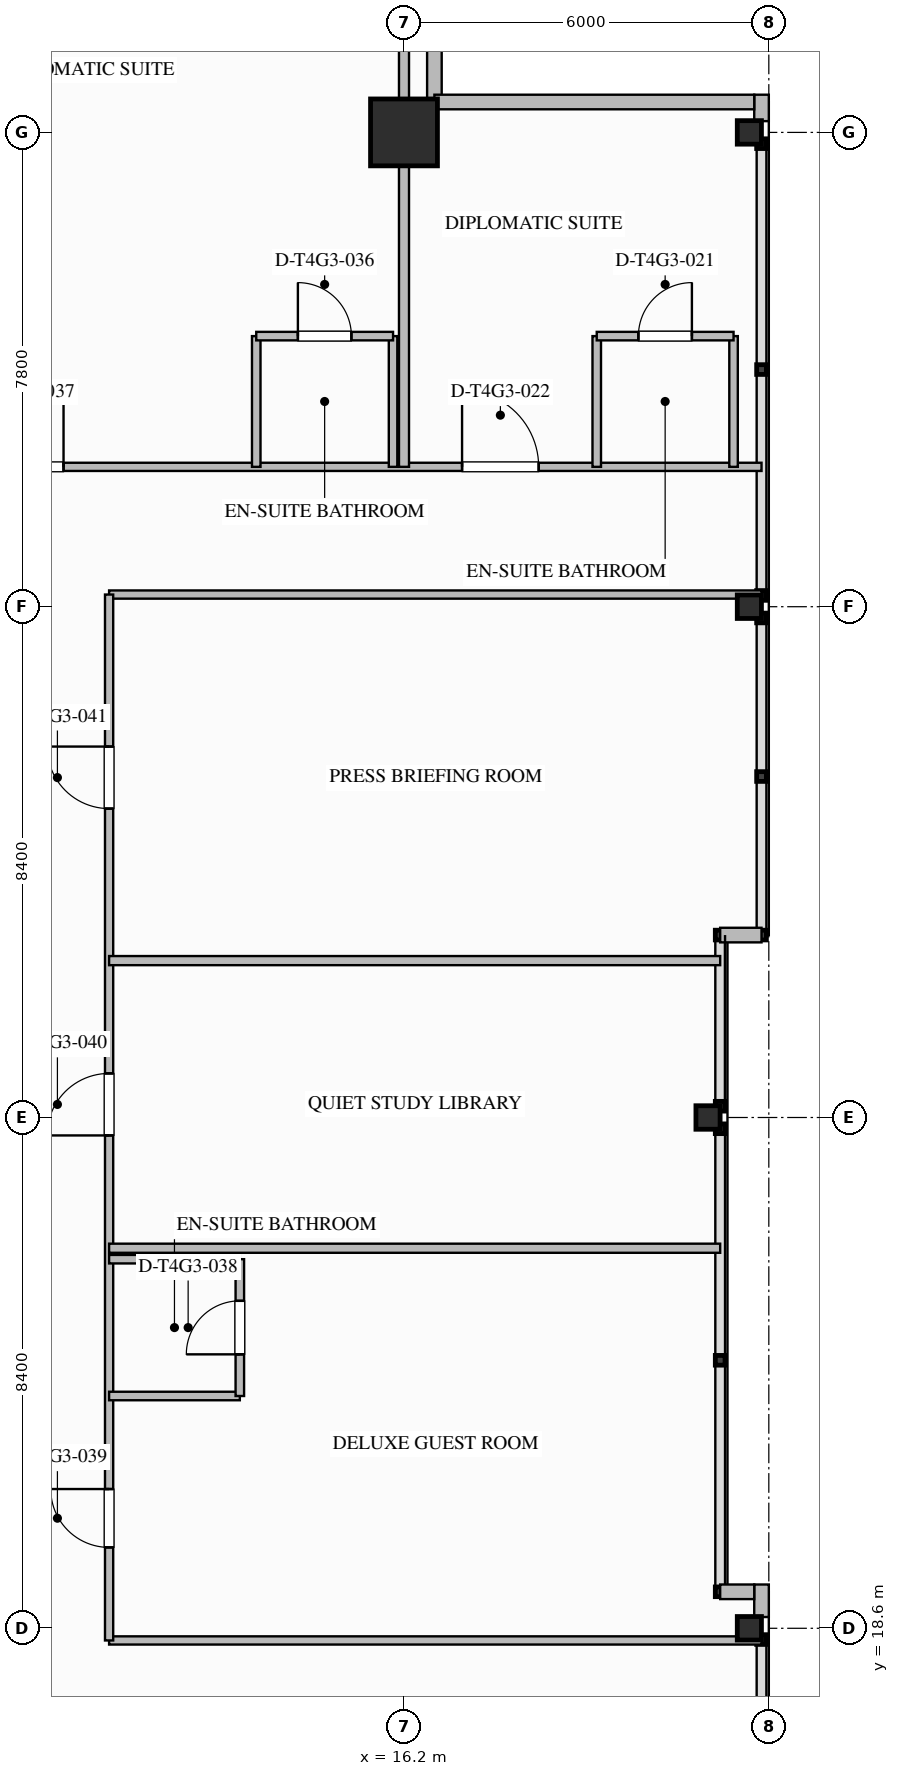
"""IFC4 building model, lengths in metres.
Left out: names, types, materials, properties, quantities, classifications, styles, units other than length and angle.
Written with IfcOpenShell. Run it as: python <this file> out.ifc"""

import sys

from ifc_helpers import new_model, si_unit, direction, frame, frame_2d, origin, origin_2d, place, context, subcontext, project, spatial, rectangle, i_section, extrude, element, fill, save


model = new_model("IFC4")
c1 = context("Model", 3, precision=1e-05, world=origin(), true_north=direction((0.0, 1.0)))
c2 = subcontext(c1, "Body", "Model", "MODEL_VIEW")
j1 = project(units=[si_unit("LENGTHUNIT", "METRE"), si_unit("PLANEANGLEUNIT", "RADIAN")], contexts=[c1])
p1 = place(None, origin())
s1 = spatial("IfcSite", under=j1, at=p1, CompositionType="ELEMENT")
p2 = place(p1, origin())
s2 = spatial("IfcBuilding", under=s1, at=p2, CompositionType="ELEMENT")
p3 = place(p2, frame((0.0, 0.0, 226.7)))
s3 = spatial("IfcBuildingStorey", under=s2, at=p3, CompositionType="ELEMENT", Elevation=226.7)
p4 = place(p3, frame((16.2, 43.2, 0.0), z_axis=(0.0, 0.0, 1.0), x_axis=(1.0, 0.0, 0.0)))
e1 = element("IfcColumn", 1, at=p4, inside=s3, PredefinedType="COLUMN", context=c2, shape_type="SweptSolid", body=[
    extrude(rectangle(XDim=1.1, YDim=1.1, at=origin_2d()), origin(), (0.0, 0.0, 1.0), 3.6),
])
for number, where, z_axis, x_axis in (
    (2, (21.88, 18.6, 0.0), (0.0, 0.0, 1.0), (1.0, 0.0, 0.0)),
    (3, (21.2, 27.0, 0.0), (0.0, 0.0, 1.0), (1.0, 0.0, 0.0)),
    (4, (21.88, 35.4, 0.0), (0.0, 0.0, 1.0), (1.0, 0.0, 0.0)),
    (5, (21.88, 43.2, 0.0), (0.0, 0.0, 1.0), (1.0, 0.0, 0.0)),
):
    element("IfcColumn", number, at=place(p3, frame(where, z_axis=z_axis, x_axis=x_axis)), inside=s3, PredefinedType="COLUMN", context=c2, shape_type="SweptSolid", body=[
        extrude(i_section(OverallWidth=0.397, OverallDepth=0.387, WebThickness=0.021, FlangeThickness=0.033, FilletRadius=0.025, at=origin_2d()), origin(), (0.0, 0.0, 1.0), 3.597),
    ])
p5 = place(p3, frame((22.08, 43.82, 0.0), z_axis=(0.0, 0.0, 1.0), x_axis=(0.0, -1.0, 0.0)))
e6 = element("IfcWall", 6, at=p5, inside=s3, PredefinedType="STANDARD", context=c2, shape_type="SweptSolid", body=[
    extrude(rectangle(XDim=0.435, YDim=0.24, at=frame_2d((0.217, 0.0))), origin(), (0.0, 0.0, 1.0), 3.34),
])
p6 = place(p3, frame((22.08, 19.32, 0.0), z_axis=(0.0, 0.0, 1.0), x_axis=(0.0, -1.0, 0.0)))
e7 = element("IfcWall", 7, at=p6, inside=s3, PredefinedType="STANDARD", context=c2, shape_type="SweptSolid", body=[
    extrude(rectangle(XDim=0.535, YDim=0.24, at=frame_2d((0.267, 0.0))), origin(), (0.0, 0.0, 1.0), 3.34),
])
for number, where, z_axis, x_axis in (
    (8, (16.7, 48.96, 0.0), (0.0, 0.0, 1.0), (0.0, -1.0, 0.0)),
    (9, (16.7, 43.7, 0.0), (0.0, 0.0, 1.0), (1.0, 0.0, 0.0)),
):
    element("IfcWall", number, at=place(p3, frame(where, z_axis=z_axis, x_axis=x_axis)), inside=s3, PredefinedType="STANDARD", context=c2, shape_type="SweptSolid", body=[
        extrude(rectangle(XDim=5.26, YDim=0.24, at=frame_2d((2.63, 0.0))), origin(), (0.0, 0.0, 1.0), 3.34),
    ])
p7 = place(p3, frame((22.08, 30.0, 0.0), z_axis=(0.0, 0.0, 1.0), x_axis=(-1.0, 0.0, 0.0)))
e10 = element("IfcWall", 10, at=p7, inside=s3, PredefinedType="STANDARD", context=c2, shape_type="SweptSolid", body=[
    extrude(rectangle(XDim=0.68, YDim=0.24, at=frame_2d((0.34, 0.0))), origin(), (0.0, 0.0, 1.0), 3.34),
])
p8 = place(p3, frame((21.4, 19.2, 0.0), z_axis=(0.0, 0.0, 1.0), x_axis=(1.0, 0.0, 0.0)))
e11 = element("IfcWall", 11, at=p8, inside=s3, PredefinedType="STANDARD", context=c2, shape_type="SweptSolid", body=[
    extrude(rectangle(XDim=0.56, YDim=0.24, at=frame_2d((0.28, 0.0))), origin(), (0.0, 0.0, 1.0), 3.34),
])
p9 = place(p3, frame((-16.2, 37.7, 0.0), z_axis=(0.0, 0.0, 1.0), x_axis=(1.0, 0.0, 0.0)))
e12 = element("IfcWall", 12, at=p9, inside=s3, PredefinedType="PARTITIONING", context=c2, shape_type="SweptSolid", body=[
    extrude(rectangle(XDim=38.28, YDim=0.135, at=frame_2d((19.14, 0.0))), origin(), (0.0, 0.0, 1.0), 3.34),
])
p10 = place(p9, frame((33.355, 0.0, 0.0)))
e13 = element("IfcOpeningElement", 13, at=p10, cuts=e12, PredefinedType="OPENING", context=c2, shape_type="SweptSolid", body=[
    extrude(rectangle(XDim=1.26, YDim=2.2, at=frame_2d((0.63, 1.1))), frame((0.0, 0.077, 0.0), z_axis=(0.0, -1.0, 0.0), x_axis=(1.0, 0.0, 0.0)), (0.0, 0.0, 1.0), 0.155),
])
p11 = place(p9, frame((2.784, 0.0, 0.0)))
e14 = element("IfcOpeningElement", 14, at=p11, cuts=e12, PredefinedType="OPENING", context=c2, shape_type="SweptSolid", body=[
    extrude(rectangle(XDim=1.26, YDim=2.2, at=frame_2d((0.63, 1.1))), frame((0.0, 0.077, 0.0), z_axis=(0.0, -1.0, 0.0), x_axis=(1.0, 0.0, 0.0)), (0.0, 0.0, 1.0), 0.155),
])
p12 = place(p9, frame((13.969, 0.0, 0.0)))
e15 = element("IfcOpeningElement", 15, at=p12, cuts=e12, PredefinedType="OPENING", context=c2, shape_type="SweptSolid", body=[
    extrude(rectangle(XDim=1.26, YDim=2.2, at=frame_2d((0.63, 1.1))), frame((0.0, 0.077, 0.0), z_axis=(0.0, -1.0, 0.0), x_axis=(1.0, 0.0, 0.0)), (0.0, 0.0, 1.0), 0.155),
])
p13 = place(p9, frame((25.541, 0.0, 0.0)))
e16 = element("IfcOpeningElement", 16, at=p13, cuts=e12, PredefinedType="OPENING", context=c2, shape_type="SweptSolid", body=[
    extrude(rectangle(XDim=1.26, YDim=2.2, at=frame_2d((0.63, 1.1))), frame((0.0, 0.077, 0.0), z_axis=(0.0, -1.0, 0.0), x_axis=(1.0, 0.0, 0.0)), (0.0, 0.0, 1.0), 0.155),
])
for number, where, z_axis, x_axis in (
    (17, (11.35, 18.4, 0.0), (0.0, 0.0, 1.0), (1.0, 0.0, 0.0)),
    (18, (11.35, 35.6, 0.0), (0.0, 0.0, 1.0), (1.0, 0.0, 0.0)),
):
    element("IfcWall", number, at=place(p3, frame(where, z_axis=z_axis, x_axis=x_axis)), inside=s3, PredefinedType="PARTITIONING", context=c2, shape_type="SweptSolid", body=[
        extrude(rectangle(XDim=10.73, YDim=0.135, at=frame_2d((5.365, 0.0))), origin(), (0.0, 0.0, 1.0), 2.718),
    ])
p14 = place(p3, frame((11.35, 18.4, 0.0), z_axis=(0.0, 0.0, 1.0), x_axis=(0.0, 1.0, 0.0)))
e19 = element("IfcWall", 19, at=p14, inside=s3, PredefinedType="PARTITIONING", context=c2, shape_type="SweptSolid", body=[
    extrude(rectangle(XDim=17.2, YDim=0.135, at=frame_2d((8.6, 0.0))), origin(), (0.0, 0.0, 1.0), 3.34),
])
p15 = place(p14, frame((1.53, 0.0, 0.0)))
e20 = element("IfcOpeningElement", 20, at=p15, cuts=e19, PredefinedType="OPENING", context=c2, shape_type="SweptSolid", body=[
    extrude(rectangle(XDim=0.96, YDim=2.15, at=frame_2d((0.48, 1.075))), frame((0.0, 0.077, 0.0), z_axis=(0.0, -1.0, 0.0), x_axis=(1.0, 0.0, 0.0)), (0.0, 0.0, 1.0), 0.155),
])
p16 = place(p14, frame((8.305, 0.0, 0.0)))
e21 = element("IfcOpeningElement", 21, at=p16, cuts=e19, PredefinedType="OPENING", context=c2, shape_type="SweptSolid", body=[
    extrude(rectangle(XDim=1.02, YDim=2.15, at=frame_2d((0.51, 1.075))), frame((0.0, 0.077, 0.0), z_axis=(0.0, -1.0, 0.0), x_axis=(1.0, 0.0, 0.0)), (0.0, 0.0, 1.0), 0.155),
])
p17 = place(p14, frame((13.68, 0.0, 0.0)))
e22 = element("IfcOpeningElement", 22, at=p17, cuts=e19, PredefinedType="OPENING", context=c2, shape_type="SweptSolid", body=[
    extrude(rectangle(XDim=1.02, YDim=2.15, at=frame_2d((0.51, 1.075))), frame((0.0, 0.077, 0.0), z_axis=(0.0, -1.0, 0.0), x_axis=(1.0, 0.0, 0.0)), (0.0, 0.0, 1.0), 0.155),
])
p18 = place(p3, frame((16.2, 37.7, 0.0), z_axis=(0.0, 0.0, 1.0), x_axis=(0.0, 1.0, 0.0)))
e23 = element("IfcWall", 23, at=p18, inside=s3, PredefinedType="PARTITIONING", context=c2, shape_type="SweptSolid", body=[
    extrude(rectangle(XDim=11.38, YDim=0.165, at=frame_2d((5.69, 0.0))), origin(), (0.0, 0.0, 1.0), 2.714),
])
for number, where, z_axis, x_axis in (
    (24, (19.37, 37.7, 0.0), (0.0, 0.0, 1.0), (0.0, 1.0, 0.0)),
    (25, (21.62, 37.7, 0.0), (0.0, 0.0, 1.0), (0.0, 1.0, 0.0)),
):
    element("IfcWall", number, at=place(p3, frame(where, z_axis=z_axis, x_axis=x_axis)), inside=s3, PredefinedType="PLUMBINGWALL", context=c2, shape_type="SweptSolid", body=[
        extrude(rectangle(XDim=2.15, YDim=0.14, at=frame_2d((1.075, 0.0))), origin(), (0.0, 0.0, 1.0), 3.34),
    ])
p19 = place(p3, frame((19.37, 39.85, 0.0), z_axis=(0.0, 0.0, 1.0), x_axis=(1.0, 0.0, 0.0)))
e26 = element("IfcWall", 26, at=p19, inside=s3, PredefinedType="PLUMBINGWALL", context=c2, shape_type="SweptSolid", body=[
    extrude(rectangle(XDim=2.25, YDim=0.14, at=frame_2d((1.125, 0.0))), origin(), (0.0, 0.0, 1.0), 3.34),
])
p20 = place(p19, frame((0.685, 0.0, 0.0)))
e27 = element("IfcOpeningElement", 27, at=p20, cuts=e26, PredefinedType="OPENING", context=c2, shape_type="SweptSolid", body=[
    extrude(rectangle(XDim=0.88, YDim=2.1, at=frame_2d((0.44, 1.05))), frame((0.0, 0.08, 0.0), z_axis=(0.0, -1.0, 0.0), x_axis=(1.0, 0.0, 0.0)), (0.0, 0.0, 1.0), 0.16),
])
p21 = place(p3, frame((13.77, 37.7, 0.0), z_axis=(0.0, 0.0, 1.0), x_axis=(0.0, 1.0, 0.0)))
e28 = element("IfcWall", 28, at=p21, inside=s3, PredefinedType="PLUMBINGWALL", context=c2, shape_type="SweptSolid", body=[
    extrude(rectangle(XDim=2.15, YDim=0.14, at=frame_2d((1.075, 0.0))), origin(), (0.0, 0.0, 1.0), 3.34),
])
p22 = place(p3, frame((16.02, 37.7, 0.0), z_axis=(0.0, 0.0, 1.0), x_axis=(0.0, 1.0, 0.0)))
e29 = element("IfcWall", 29, at=p22, inside=s3, PredefinedType="PLUMBINGWALL", context=c2, shape_type="SweptSolid", body=[
    extrude(rectangle(XDim=2.15, YDim=0.14, at=frame_2d((1.075, 0.0))), origin(), (0.0, 0.0, 1.0), 2.714),
])
p23 = place(p3, frame((13.77, 39.85, 0.0), z_axis=(0.0, 0.0, 1.0), x_axis=(1.0, 0.0, 0.0)))
e30 = element("IfcWall", 30, at=p23, inside=s3, PredefinedType="PLUMBINGWALL", context=c2, shape_type="SweptSolid", body=[
    extrude(rectangle(XDim=2.25, YDim=0.14, at=frame_2d((1.125, 0.0))), origin(), (0.0, 0.0, 1.0), 3.34),
])
p24 = place(p23, frame((0.685, 0.0, 0.0)))
e31 = element("IfcOpeningElement", 31, at=p24, cuts=e30, PredefinedType="OPENING", context=c2, shape_type="SweptSolid", body=[
    extrude(rectangle(XDim=0.88, YDim=2.1, at=frame_2d((0.44, 1.05))), frame((0.0, 0.08, 0.0), z_axis=(0.0, -1.0, 0.0), x_axis=(1.0, 0.0, 0.0)), (0.0, 0.0, 1.0), 0.16),
])
for number, where, z_axis, x_axis in (
    (32, (11.35, 22.42, 0.0), (0.0, 0.0, 1.0), (1.0, 0.0, 0.0)),
    (33, (11.35, 24.67, 0.0), (0.0, 0.0, 1.0), (1.0, 0.0, 0.0)),
):
    element("IfcWall", number, at=place(p3, frame(where, z_axis=z_axis, x_axis=x_axis)), inside=s3, PredefinedType="PLUMBINGWALL", context=c2, shape_type="SweptSolid", body=[
        extrude(rectangle(XDim=2.15, YDim=0.14, at=frame_2d((1.075, 0.0))), origin(), (0.0, 0.0, 1.0), 3.34),
    ])
p25 = place(p3, frame((13.5, 22.42, 0.0), z_axis=(0.0, 0.0, 1.0), x_axis=(0.0, 1.0, 0.0)))
e34 = element("IfcWall", 34, at=p25, inside=s3, PredefinedType="PLUMBINGWALL", context=c2, shape_type="SweptSolid", body=[
    extrude(rectangle(XDim=2.25, YDim=0.14, at=frame_2d((1.125, 0.0))), origin(), (0.0, 0.0, 1.0), 3.34),
])
p26 = place(p25, frame((0.685, 0.0, 0.0)))
e35 = element("IfcOpeningElement", 35, at=p26, cuts=e34, PredefinedType="OPENING", context=c2, shape_type="SweptSolid", body=[
    extrude(rectangle(XDim=0.88, YDim=2.1, at=frame_2d((0.44, 1.05))), frame((0.0, 0.08, 0.0), z_axis=(0.0, -1.0, 0.0), x_axis=(1.0, 0.0, 0.0)), (0.0, 0.0, 1.0), 0.16),
])
for number, where, z_axis, x_axis in (
    (36, (11.35, 24.85, 0.0), (0.0, 0.0, 1.0), (1.0, 0.0, 0.0)),
    (37, (11.35, 29.58, 0.0), (0.0, 0.0, 1.0), (1.0, 0.0, 0.0)),
):
    element("IfcWall", number, at=place(p3, frame(where, z_axis=z_axis, x_axis=x_axis)), inside=s3, PredefinedType="PARTITIONING", context=c2, shape_type="SweptSolid", body=[
        extrude(rectangle(XDim=10.05, YDim=0.15, at=frame_2d((5.025, 0.0))), origin(), (0.0, 0.0, 1.0), 3.34),
    ])
p27 = place(p20, origin())
e38 = element("IfcDoor", 38, at=p27, inside=s3, OperationType="SINGLE_SWING_RIGHT", PredefinedType="DOOR", context=c2, shape_type="SweptSolid", body=[
    extrude(rectangle(XDim=0.88, YDim=2.1, at=frame_2d((0.44, 1.05))), frame((0.0, 0.025, 0.0), z_axis=(0.0, -1.0, 0.0), x_axis=(1.0, 0.0, 0.0)), (0.0, 0.0, 1.0), 0.05),
])
fill(e27, e38)
p28 = place(p10, origin())
e39 = element("IfcDoor", 39, at=p28, inside=s3, OperationType="SINGLE_SWING_LEFT", PredefinedType="DOOR", context=c2, shape_type="SweptSolid", body=[
    extrude(rectangle(XDim=1.26, YDim=2.2, at=frame_2d((0.63, 1.1))), frame((0.0, 0.025, 0.0), z_axis=(0.0, -1.0, 0.0), x_axis=(1.0, 0.0, 0.0)), (0.0, 0.0, 1.0), 0.05),
])
fill(e13, e39)
p29 = place(p24, origin())
e40 = element("IfcDoor", 40, at=p29, inside=s3, OperationType="SINGLE_SWING_LEFT", PredefinedType="DOOR", context=c2, shape_type="SweptSolid", body=[
    extrude(rectangle(XDim=0.88, YDim=2.1, at=frame_2d((0.44, 1.05))), frame((0.0, 0.025, 0.0), z_axis=(0.0, -1.0, 0.0), x_axis=(1.0, 0.0, 0.0)), (0.0, 0.0, 1.0), 0.05),
])
fill(e31, e40)
p30 = place(p13, origin())
e41 = element("IfcDoor", 41, at=p30, inside=s3, OperationType="SINGLE_SWING_RIGHT", PredefinedType="DOOR", context=c2, shape_type="SweptSolid", body=[
    extrude(rectangle(XDim=1.26, YDim=2.2, at=frame_2d((0.63, 1.1))), frame((0.0, 0.025, 0.0), z_axis=(0.0, -1.0, 0.0), x_axis=(1.0, 0.0, 0.0)), (0.0, 0.0, 1.0), 0.05),
])
fill(e16, e41)
p31 = place(p26, origin())
e42 = element("IfcDoor", 42, at=p31, inside=s3, OperationType="SINGLE_SWING_LEFT", PredefinedType="DOOR", context=c2, shape_type="SweptSolid", body=[
    extrude(rectangle(XDim=0.88, YDim=2.1, at=frame_2d((0.44, 1.05))), frame((0.0, 0.025, 0.0), z_axis=(0.0, -1.0, 0.0), x_axis=(1.0, 0.0, 0.0)), (0.0, 0.0, 1.0), 0.05),
])
fill(e35, e42)
p32 = place(p15, origin())
e43 = element("IfcDoor", 43, at=p32, inside=s3, OperationType="SINGLE_SWING_RIGHT", PredefinedType="DOOR", context=c2, shape_type="SweptSolid", body=[
    extrude(rectangle(XDim=0.96, YDim=2.15, at=frame_2d((0.48, 1.075))), frame((0.0, 0.025, 0.0), z_axis=(0.0, -1.0, 0.0), x_axis=(1.0, 0.0, 0.0)), (0.0, 0.0, 1.0), 0.05),
])
fill(e20, e43)
p33 = place(p16, origin())
e44 = element("IfcDoor", 44, at=p33, inside=s3, OperationType="SINGLE_SWING_LEFT", PredefinedType="DOOR", context=c2, shape_type="SweptSolid", body=[
    extrude(rectangle(XDim=1.02, YDim=2.15, at=frame_2d((0.51, 1.075))), frame((0.0, 0.025, 0.0), z_axis=(0.0, -1.0, 0.0), x_axis=(1.0, 0.0, 0.0)), (0.0, 0.0, 1.0), 0.05),
])
fill(e21, e44)
p34 = place(p17, origin())
e45 = element("IfcDoor", 45, at=p34, inside=s3, OperationType="SINGLE_SWING_RIGHT", PredefinedType="DOOR", context=c2, shape_type="SweptSolid", body=[
    extrude(rectangle(XDim=1.02, YDim=2.15, at=frame_2d((0.51, 1.075))), frame((0.0, 0.025, 0.0), z_axis=(0.0, -1.0, 0.0), x_axis=(1.0, 0.0, 0.0)), (0.0, 0.0, 1.0), 0.05),
])
fill(e22, e45)
save(model, sys.argv[1])
